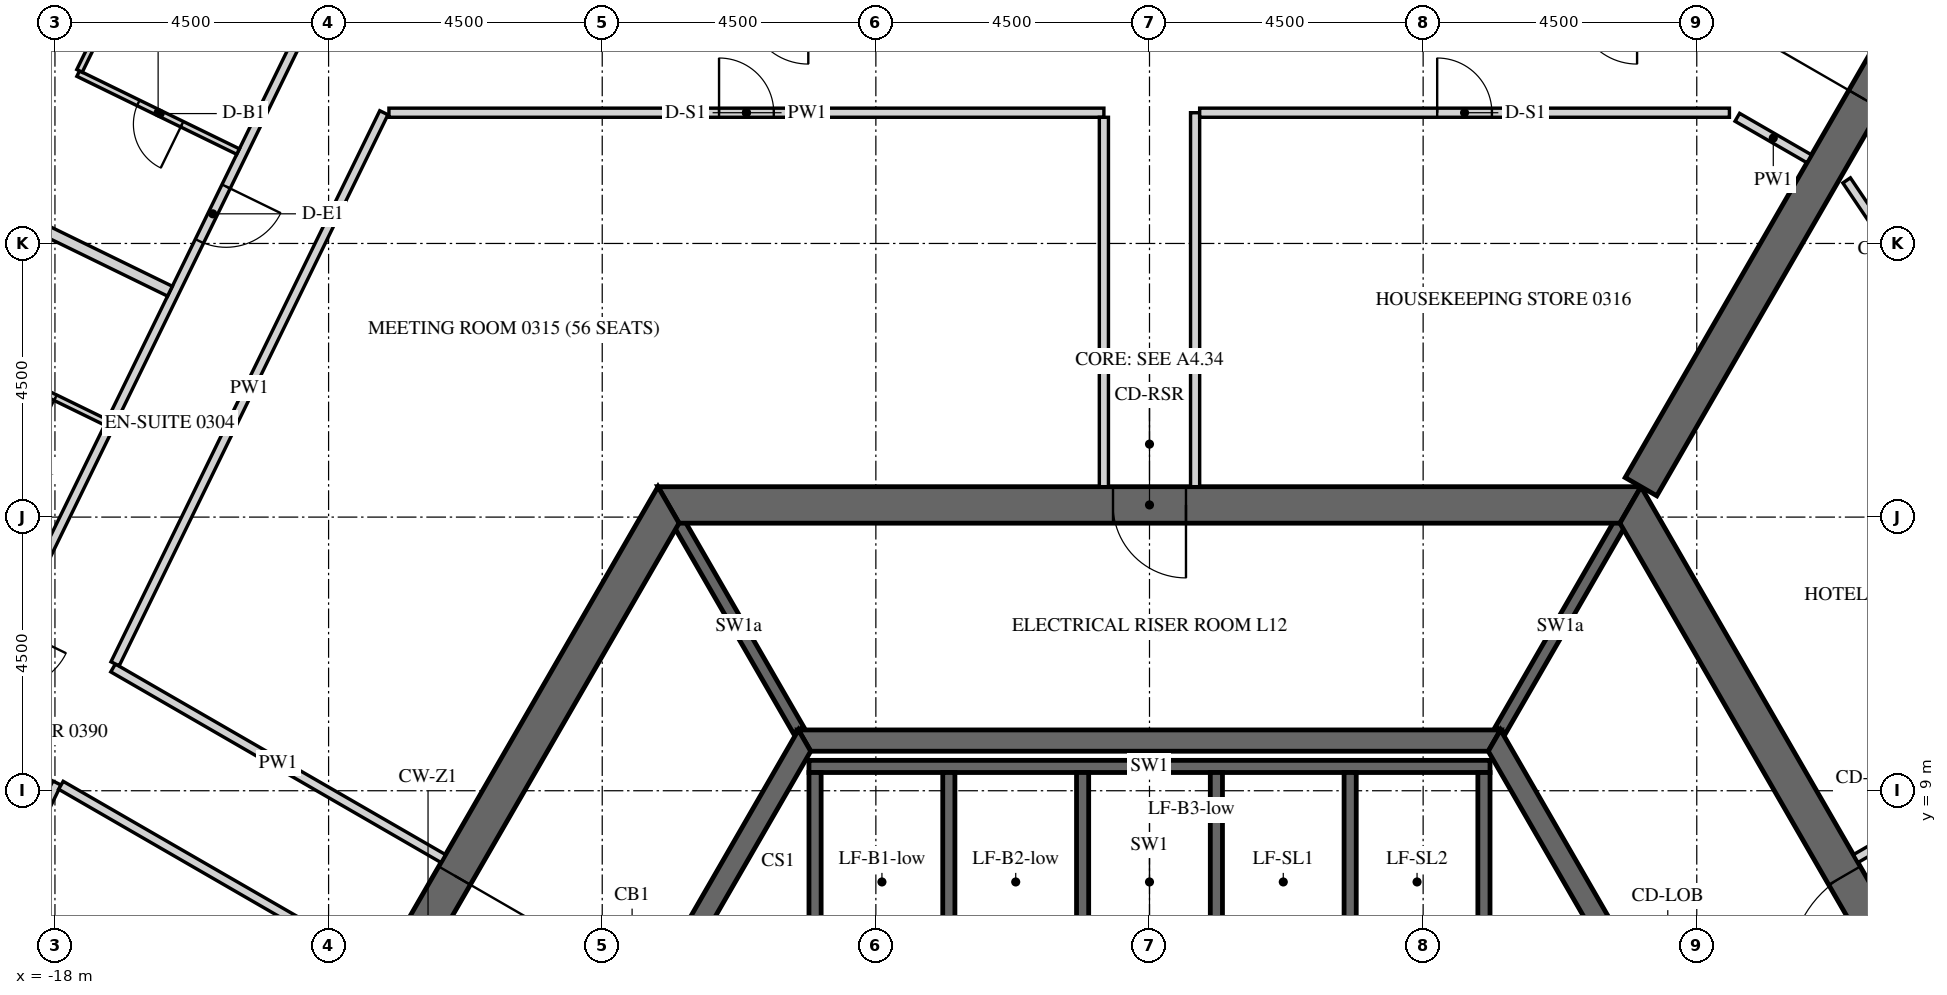
"""IFC4 building model, lengths in metres.
Left out: names, types, materials, properties, quantities, classifications, styles, units other than length and angle.
Written with IfcOpenShell. Run it as: python <this file> out.ifc"""

import sys

from ifc_helpers import new_model, si_unit, direction, frame, frame_2d, origin, place, context, subcontext, project, spatial, polyline, rectangle, outline, extrude, element, fill, save


model = new_model("IFC4")
c1 = context("Model", 3, precision=1e-05, world=origin(), true_north=direction((0.0, 1.0)))
c2 = subcontext(c1, "Body", "Model", "MODEL_VIEW")
j1 = project(units=[si_unit("LENGTHUNIT", "METRE"), si_unit("PLANEANGLEUNIT", "RADIAN")], contexts=[c1])
p1 = place(None, origin())
s1 = spatial("IfcSite", under=j1, at=p1, CompositionType="ELEMENT")
p2 = place(p1, origin())
s2 = spatial("IfcBuilding", under=s1, at=p2, CompositionType="ELEMENT")
p3 = place(p2, frame((0.0, 0.0, 60.9)))
s3 = spatial("IfcBuildingStorey", under=s2, at=p3, CompositionType="ELEMENT", Elevation=60.9)
p4 = place(p3, frame((-7.91, 13.7, -0.15), z_axis=(0.0, 0.0, 1.0), x_axis=(-0.499999880136, -0.866025472988, 0.0)))
e1 = element("IfcWall", 1, at=p4, inside=s3, PredefinedType="SHEAR", context=c2, shape_type="SweptSolid", body=[
    extrude(outline(polyline([(-0.173, -0.3), (15.993, -0.3), (15.646, 0.3), (0.173, 0.3), (-0.173, -0.3)])), origin(), (0.0, 0.0, 1.0), 3.9),
])
p5 = place(p4, frame((7.039, 0.0, 0.15)))
e2 = element("IfcOpeningElement", 2, at=p5, cuts=e1, PredefinedType="OPENING", context=c2, shape_type="SweptSolid", body=[
    extrude(rectangle(XDim=1.8, YDim=2.4, at=frame_2d((0.9, 1.2))), frame((0.0, 0.31, 0.0), z_axis=(0.0, -1.0, 0.0), x_axis=(1.0, 0.0, 0.0)), (0.0, 0.0, 1.0), 0.62),
])
p6 = place(p3, frame((15.819, 0.0, -0.15), z_axis=(0.0, 0.0, 1.0), x_axis=(-0.499999880136, 0.866025472988, 0.0)))
e3 = element("IfcWall", 3, at=p6, inside=s3, PredefinedType="SHEAR", context=c2, shape_type="SweptSolid", body=[
    extrude(outline(polyline([(-0.173, -0.3), (15.993, -0.3), (15.646, 0.3), (0.173, 0.3), (-0.173, -0.3)])), origin(), (0.0, 0.0, 1.0), 3.9),
])
p7 = place(p6, frame((6.981, 0.0, 0.15)))
e4 = element("IfcOpeningElement", 4, at=p7, cuts=e3, PredefinedType="OPENING", context=c2, shape_type="SweptSolid", body=[
    extrude(rectangle(XDim=1.8, YDim=2.4, at=frame_2d((0.9, 1.2))), frame((0.0, 0.31, 0.0), z_axis=(0.0, -1.0, 0.0), x_axis=(1.0, 0.0, 0.0)), (0.0, 0.0, 1.0), 0.62),
])
p8 = place(p3, frame((7.91, 13.7, -0.15), z_axis=(0.0, 0.0, 1.0), x_axis=(-1.0, 0.0, 0.0)))
e5 = element("IfcWall", 5, at=p8, inside=s3, PredefinedType="SHEAR", context=c2, shape_type="SweptSolid", body=[
    extrude(outline(polyline([(-0.173, -0.3), (15.993, -0.3), (15.646, 0.3), (0.173, 0.3), (-0.173, -0.3)])), origin(), (0.0, 0.0, 1.0), 3.9),
])
p9 = place(p8, frame((7.31, 0.0, 0.15)))
e6 = element("IfcOpeningElement", 6, at=p9, cuts=e5, PredefinedType="OPENING", context=c2, shape_type="SweptSolid", body=[
    extrude(rectangle(XDim=1.2, YDim=2.4, at=frame_2d((0.6, 1.2))), frame((0.0, 0.31, 0.0), z_axis=(0.0, -1.0, 0.0), x_axis=(1.0, 0.0, 0.0)), (0.0, 0.0, 1.0), 0.62),
])
p10 = place(p3, frame((8.083, 14.0, -0.15), z_axis=(0.0, 0.0, 1.0), x_axis=(0.499997680643, 0.866026742862, 0.0)))
e7 = element("IfcWall", 7, at=p10, inside=s3, PredefinedType="SHEAR", context=c2, shape_type="SweptSolid", body=[
    extrude(rectangle(XDim=16.509, YDim=0.6, at=frame_2d((8.254, 0.0))), origin(), (0.0, 0.0, 1.0), 3.9),
])
p11 = place(p10, frame((7.354, 0.0, 0.15)))
e8 = element("IfcOpeningElement", 8, at=p11, cuts=e7, PredefinedType="OPENING", context=c2, shape_type="SweptSolid", body=[
    extrude(rectangle(XDim=1.8, YDim=2.4, at=frame_2d((0.9, 1.2))), frame((0.0, 0.31, 0.0), z_axis=(0.0, -1.0, 0.0), x_axis=(1.0, 0.0, 0.0)), (0.0, 0.0, 1.0), 0.62),
])
p12 = place(p3, frame((-5.673, 9.825, -0.15), z_axis=(0.0, 0.0, 1.0), x_axis=(-0.499995046907, -0.866028263435, 0.0)))
e9 = element("IfcWall", 9, at=p12, inside=s3, PredefinedType="SHEAR", context=c2, shape_type="SweptSolid", body=[
    extrude(outline(polyline([(-0.101, -0.175), (11.446, -0.175), (11.244, 0.175), (0.101, 0.175), (-0.101, -0.175)])), origin(), (0.0, 0.0, 1.0), 3.9),
])
p13 = place(p12, frame((4.801, 0.0, 0.15)))
e10 = element("IfcOpeningElement", 10, at=p13, cuts=e9, PredefinedType="OPENING", context=c2, shape_type="SweptSolid", body=[
    extrude(rectangle(XDim=1.8, YDim=2.4, at=frame_2d((0.9, 1.2))), frame((0.0, 0.185, 0.0), z_axis=(0.0, -1.0, 0.0), x_axis=(1.0, 0.0, 0.0)), (0.0, 0.0, 1.0), 0.37),
])
p14 = place(p3, frame((11.345, 0.0, -0.15), z_axis=(0.0, 0.0, 1.0), x_axis=(-0.499995046907, 0.866028263435, 0.0)))
e11 = element("IfcWall", 11, at=p14, inside=s3, PredefinedType="SHEAR", context=c2, shape_type="SweptSolid", body=[
    extrude(outline(polyline([(-0.101, -0.175), (11.446, -0.175), (11.244, 0.175), (0.101, 0.175), (-0.101, -0.175)])), origin(), (0.0, 0.0, 1.0), 3.9),
])
p15 = place(p14, frame((4.744, 0.0, 0.15)))
e12 = element("IfcOpeningElement", 12, at=p15, cuts=e11, PredefinedType="OPENING", context=c2, shape_type="SweptSolid", body=[
    extrude(rectangle(XDim=1.8, YDim=2.4, at=frame_2d((0.9, 1.2))), frame((0.0, 0.185, 0.0), z_axis=(0.0, -1.0, 0.0), x_axis=(1.0, 0.0, 0.0)), (0.0, 0.0, 1.0), 0.37),
])
p16 = place(p3, frame((5.673, 9.825, -0.15), z_axis=(0.0, 0.0, 1.0), x_axis=(-1.0, 0.0, 0.0)))
e13 = element("IfcWall", 13, at=p16, inside=s3, PredefinedType="SHEAR", context=c2, shape_type="SweptSolid", body=[
    extrude(outline(polyline([(-0.101, -0.175), (11.446, -0.175), (11.244, 0.175), (0.101, 0.175), (-0.101, -0.175)])), origin(), (0.0, 0.0, 1.0), 3.9),
])
p17 = place(p3, frame((-5.6, 9.4, -0.25), z_axis=(0.0, 0.0, 1.0), x_axis=(1.0, 0.0, 0.0)))
e14 = element("IfcWall", 14, at=p17, inside=s3, PredefinedType="SHEAR", context=c2, shape_type="SweptSolid", body=[
    extrude(rectangle(XDim=11.2, YDim=0.2, at=frame_2d((5.6, 0.0))), origin(), (0.0, 0.0, 1.0), 3.9),
])
for number, where, z_axis, x_axis in (
    (15, (-5.5, 6.4, -0.25), (0.0, 0.0, 1.0), (0.0, 1.0, 0.0)),
    (16, (-3.3, 6.4, -0.25), (0.0, 0.0, 1.0), (0.0, 1.0, 0.0)),
    (17, (-1.1, 6.4, -0.25), (0.0, 0.0, 1.0), (0.0, 1.0, 0.0)),
    (18, (1.1, 6.4, -0.25), (0.0, 0.0, 1.0), (0.0, 1.0, 0.0)),
    (19, (3.3, 6.4, -0.25), (0.0, 0.0, 1.0), (0.0, 1.0, 0.0)),
    (20, (5.5, 6.4, -0.25), (0.0, 0.0, 1.0), (0.0, 1.0, 0.0)),
):
    element("IfcWall", number, at=place(p3, frame(where, z_axis=z_axis, x_axis=x_axis)), inside=s3, PredefinedType="SHEAR", context=c2, shape_type="SweptSolid", body=[
        extrude(rectangle(XDim=2.9, YDim=0.2, at=frame_2d((1.45, 0.0))), origin(), (0.0, 0.0, 1.0), 3.9),
    ])
for number, where, z_axis, x_axis in (
    (21, (5.773, 10.0, -0.15), (0.0, 0.0, 1.0), (0.5, 0.866, 0.0)),
    (22, (-5.773, 10.0, -0.15), (0.0, 0.0, 1.0), (-0.5, 0.866, 0.0)),
):
    element("IfcWall", number, at=place(p3, frame(where, z_axis=z_axis, x_axis=x_axis)), inside=s3, PredefinedType="SHEAR", context=c2, shape_type="SweptSolid", body=[
        extrude(rectangle(XDim=3.926, YDim=0.2, at=frame_2d((1.963, 0.0))), origin(), (0.0, 0.0, 1.0), 3.9),
    ])
p18 = place(p3, frame((-13.752, 21.875, 0.0), z_axis=(0.0, 0.0, 1.0), x_axis=(-0.438376846054, -0.898791266559, 0.0)))
e23 = element("IfcWall", 23, at=p18, inside=s3, PredefinedType="PARTITIONING", context=c2, shape_type="SweptSolid", body=[
    extrude(rectangle(XDim=22.002, YDim=0.15, at=frame_2d((11.001, 0.0))), origin(), (0.0, 0.0, 1.0), 2.988),
])
p19 = place(p18, frame((3.269, 0.0, 0.0)))
e24 = element("IfcOpeningElement", 24, at=p19, cuts=e23, PredefinedType="OPENING", context=c2, shape_type="SweptSolid", body=[
    extrude(rectangle(XDim=1.0, YDim=2.1, at=frame_2d((0.5, 1.05))), frame((0.0, 0.085, 0.0), z_axis=(0.0, -1.0, 0.0), x_axis=(1.0, 0.0, 0.0)), (0.0, 0.0, 1.0), 0.17),
])
p20 = place(p18, frame((11.321, 0.0, 0.0)))
e25 = element("IfcOpeningElement", 25, at=p20, cuts=e23, PredefinedType="OPENING", context=c2, shape_type="SweptSolid", body=[
    extrude(rectangle(XDim=1.0, YDim=2.1, at=frame_2d((0.5, 1.05))), frame((0.0, 0.085, 0.0), z_axis=(0.0, -1.0, 0.0), x_axis=(1.0, 0.0, 0.0)), (0.0, 0.0, 1.0), 0.17),
])
p21 = place(p18, frame((19.812, 0.0, 0.0)))
e26 = element("IfcOpeningElement", 26, at=p21, cuts=e23, PredefinedType="OPENING", context=c2, shape_type="SweptSolid", body=[
    extrude(rectangle(XDim=1.0, YDim=2.1, at=frame_2d((0.5, 1.05))), frame((0.0, 0.085, 0.0), z_axis=(0.0, -1.0, 0.0), x_axis=(1.0, 0.0, 0.0)), (0.0, 0.0, 1.0), 0.17),
])
p22 = place(p3, frame((-11.614, 7.884, 0.0), z_axis=(0.0, 0.0, 1.0), x_axis=(-0.866025438137, 0.4999999405, 0.0)))
e27 = element("IfcWall", 27, at=p22, inside=s3, PredefinedType="PARTITIONING", context=c2, shape_type="SweptSolid", body=[
    extrude(rectangle(XDim=6.271, YDim=0.15, at=frame_2d((3.135, 0.0))), origin(), (0.0, 0.0, 1.0), 2.988),
])
p23 = place(p3, frame((-17.011, 11.087, 0.0), z_axis=(0.0, 0.0, 1.0), x_axis=(0.43836877185, 0.898795204631, 0.0)))
e28 = element("IfcWall", 28, at=p23, inside=s3, PredefinedType="PARTITIONING", context=c2, shape_type="SweptSolid", body=[
    extrude(rectangle(XDim=10.083, YDim=0.15, at=frame_2d((5.042, 0.0))), origin(), (0.0, 0.0, 1.0), 2.988),
])
p24 = place(p3, frame((-12.508, 20.15, 0.0), z_axis=(0.0, 0.0, 1.0), x_axis=(1.0, 0.0, 0.0)))
e29 = element("IfcWall", 29, at=p24, inside=s3, PredefinedType="PARTITIONING", context=c2, shape_type="SweptSolid", body=[
    extrude(rectangle(XDim=11.758, YDim=0.15, at=frame_2d((5.879, 0.0))), origin(), (0.0, 0.0, 1.0), 2.988),
])
p25 = place(p24, frame((5.429, 0.0, 0.0)))
e30 = element("IfcOpeningElement", 30, at=p25, cuts=e29, PredefinedType="OPENING", context=c2, shape_type="SweptSolid", body=[
    extrude(rectangle(XDim=0.9, YDim=2.1, at=frame_2d((0.45, 1.05))), frame((0.0, 0.085, 0.0), z_axis=(0.0, -1.0, 0.0), x_axis=(1.0, 0.0, 0.0)), (0.0, 0.0, 1.0), 0.17),
])
p26 = place(p3, frame((-0.75, 20.075, 0.0), z_axis=(0.0, 0.0, 1.0), x_axis=(0.0, -1.0, 0.0)))
e31 = element("IfcWall", 31, at=p26, inside=s3, PredefinedType="PARTITIONING", context=c2, shape_type="SweptSolid", body=[
    extrude(rectangle(XDim=6.075, YDim=0.15, at=frame_2d((3.038, 0.0))), origin(), (0.0, 0.0, 1.0), 2.988),
])
p27 = place(p3, frame((0.75, 14.0, 0.0), z_axis=(0.0, 0.0, 1.0), x_axis=(0.0, 1.0, 0.0)))
e32 = element("IfcWall", 32, at=p27, inside=s3, PredefinedType="PARTITIONING", context=c2, shape_type="SweptSolid", body=[
    extrude(rectangle(XDim=6.15, YDim=0.15, at=frame_2d((3.075, 0.0))), origin(), (0.0, 0.0, 1.0), 2.988),
])
p28 = place(p3, frame((0.825, 20.15, 0.0), z_axis=(0.0, 0.0, 1.0), x_axis=(1.0, 0.0, 0.0)))
e33 = element("IfcWall", 33, at=p28, inside=s3, PredefinedType="PARTITIONING", context=c2, shape_type="SweptSolid", body=[
    extrude(rectangle(XDim=8.712, YDim=0.15, at=frame_2d((4.356, 0.0))), origin(), (0.0, 0.0, 1.0), 2.988),
])
p29 = place(p28, frame((3.906, 0.0, 0.0)))
e34 = element("IfcOpeningElement", 34, at=p29, cuts=e33, PredefinedType="OPENING", context=c2, shape_type="SweptSolid", body=[
    extrude(rectangle(XDim=0.9, YDim=2.1, at=frame_2d((0.45, 1.05))), frame((0.0, 0.085, 0.0), z_axis=(0.0, -1.0, 0.0), x_axis=(1.0, 0.0, 0.0)), (0.0, 0.0, 1.0), 0.17),
])
p30 = place(p3, frame((9.667, 20.075, 0.0), z_axis=(0.0, 0.0, 1.0), x_axis=(0.866000994684, -0.500042275419, 0.0)))
e35 = element("IfcWall", 35, at=p30, inside=s3, PredefinedType="PARTITIONING", context=c2, shape_type="SweptSolid", body=[
    extrude(rectangle(XDim=1.366, YDim=0.15, at=frame_2d((0.683, 0.0))), origin(), (0.0, 0.0, 1.0), 2.988),
])
p31 = place(p3, frame((-22.219, 0.41, 0.0), z_axis=(0.0, 0.0, 1.0), x_axis=(0.438391891827, 0.898783927972, 0.0)))
e36 = element("IfcWall", 36, at=p31, inside=s3, PredefinedType="PARTITIONING", context=c2, shape_type="SweptSolid", body=[
    extrude(rectangle(XDim=9.699, YDim=0.15, at=frame_2d((4.85, 0.0))), origin(), (0.0, 0.0, 1.0), 2.988),
])
p32 = place(p31, frame((4.4, 0.0, 0.0)))
e37 = element("IfcOpeningElement", 37, at=p32, cuts=e36, PredefinedType="OPENING", context=c2, shape_type="SweptSolid", body=[
    extrude(rectangle(XDim=0.9, YDim=2.1, at=frame_2d((0.45, 1.05))), frame((0.0, 0.085, 0.0), z_axis=(0.0, -1.0, 0.0), x_axis=(1.0, 0.0, 0.0)), (0.0, 0.0, 1.0), 0.17),
])
p33 = place(p3, frame((-17.902, 9.09, 0.0), z_axis=(0.0, 0.0, 1.0), x_axis=(0.866036368755, -0.499981007633, 0.0)))
e38 = element("IfcWall", 38, at=p33, inside=s3, PredefinedType="PARTITIONING", context=c2, shape_type="SweptSolid", body=[
    extrude(rectangle(XDim=6.049, YDim=0.15, at=frame_2d((3.024, 0.0))), origin(), (0.0, 0.0, 1.0), 2.988),
])
p34 = place(p3, frame((11.465, 19.037, 0.0), z_axis=(0.0, 0.0, 1.0), x_axis=(0.559196064773, -0.829035440221, 0.0)))
e39 = element("IfcWall", 39, at=p34, inside=s3, PredefinedType="PARTITIONING", context=c2, shape_type="SweptSolid", body=[
    extrude(rectangle(XDim=9.757, YDim=0.15, at=frame_2d((4.878, 0.0))), origin(), (0.0, 0.0, 1.0), 2.988),
])
p35 = place(p34, frame((4.428, 0.0, 0.0)))
e40 = element("IfcOpeningElement", 40, at=p35, cuts=e39, PredefinedType="OPENING", context=c2, shape_type="SweptSolid", body=[
    extrude(rectangle(XDim=0.9, YDim=2.1, at=frame_2d((0.45, 1.05))), frame((0.0, 0.085, 0.0), z_axis=(0.0, -1.0, 0.0), x_axis=(1.0, 0.0, 0.0)), (0.0, 0.0, 1.0), 0.17),
])
p36 = place(p3, frame((16.855, 10.911, 0.0), z_axis=(0.0, 0.0, 1.0), x_axis=(-0.866020343444, -0.500008764664, 0.0)))
e41 = element("IfcWall", 41, at=p36, inside=s3, PredefinedType="PARTITIONING", context=c2, shape_type="SweptSolid", body=[
    extrude(rectangle(XDim=6.053, YDim=0.15, at=frame_2d((3.026, 0.0))), origin(), (0.0, 0.0, 1.0), 2.988),
])
p37 = place(p3, frame((-14.989, 19.511, 0.0), z_axis=(0.0, 0.0, 1.0), x_axis=(-0.898790906006, 0.438377585285, 0.0)))
e42 = element("IfcWall", 42, at=p37, inside=s3, PredefinedType="PARTITIONING", context=c2, shape_type="SweptSolid", body=[
    extrude(rectangle(XDim=2.925, YDim=0.1, at=frame_2d((1.462, 0.0))), origin(), (0.0, 0.0, 1.0), 2.988),
])
p38 = place(p37, frame((1.025, 0.0, 0.0)))
e43 = element("IfcOpeningElement", 43, at=p38, cuts=e42, PredefinedType="OPENING", context=c2, shape_type="SweptSolid", body=[
    extrude(rectangle(XDim=0.8, YDim=2.1, at=frame_2d((0.4, 1.05))), frame((0.0, 0.06, 0.0), z_axis=(0.0, -1.0, 0.0), x_axis=(1.0, 0.0, 0.0)), (0.0, 0.0, 1.0), 0.12),
])
p39 = place(p3, frame((-17.596, 20.838, 0.0), z_axis=(0.0, 0.0, 1.0), x_axis=(0.438423632021, 0.898768445644, 0.0)))
e44 = element("IfcWall", 44, at=p39, inside=s3, PredefinedType="PARTITIONING", context=c2, shape_type="SweptSolid", body=[
    extrude(rectangle(XDim=2.35, YDim=0.1, at=frame_2d((1.175, 0.0))), origin(), (0.0, 0.0, 1.0), 2.988),
])
p40 = place(p3, frame((-22.782, 20.47, 0.0), z_axis=(0.0, 0.0, 1.0), x_axis=(0.898783297359, -0.438393184697, 0.0)))
e45 = element("IfcWall", 45, at=p40, inside=s3, PredefinedType="PARTITIONING", context=c2, shape_type="SweptSolid", body=[
    extrude(rectangle(XDim=7.425, YDim=0.18, at=frame_2d((3.712, 0.0))), origin(), (0.0, 0.0, 1.0), 2.988),
])
p41 = place(p3, frame((-17.161, 15.058, 0.0), z_axis=(0.0, 0.0, 1.0), x_axis=(-0.898791692788, 0.43837597217, 0.0)))
e46 = element("IfcWall", 46, at=p41, inside=s3, PredefinedType="PARTITIONING", context=c2, shape_type="SweptSolid", body=[
    extrude(rectangle(XDim=2.725, YDim=0.1, at=frame_2d((1.363, 0.0))), origin(), (0.0, 0.0, 1.0), 2.988),
])
p42 = place(p41, frame((0.925, 0.0, 0.0)))
e47 = element("IfcOpeningElement", 47, at=p42, cuts=e46, PredefinedType="OPENING", context=c2, shape_type="SweptSolid", body=[
    extrude(rectangle(XDim=0.8, YDim=2.1, at=frame_2d((0.4, 1.05))), frame((0.0, 0.06, 0.0), z_axis=(0.0, -1.0, 0.0), x_axis=(1.0, 0.0, 0.0)), (0.0, 0.0, 1.0), 0.12),
])
p43 = place(p5, origin())
e48 = element("IfcDoor", 48, at=p43, inside=s3, OperationType="DOUBLE_DOOR_SINGLE_SWING", PredefinedType="DOOR", context=c2, shape_type="SweptSolid", body=[
    extrude(rectangle(XDim=1.8, YDim=2.4, at=frame_2d((0.9, 1.2))), frame((0.0, 0.025, 0.0), z_axis=(0.0, -1.0, 0.0), x_axis=(1.0, 0.0, 0.0)), (0.0, 0.0, 1.0), 0.05),
])
fill(e2, e48)
p44 = place(p7, origin())
e49 = element("IfcDoor", 49, at=p44, inside=s3, OperationType="DOUBLE_DOOR_SINGLE_SWING", PredefinedType="DOOR", context=c2, shape_type="SweptSolid", body=[
    extrude(rectangle(XDim=1.8, YDim=2.4, at=frame_2d((0.9, 1.2))), frame((0.0, 0.025, 0.0), z_axis=(0.0, -1.0, 0.0), x_axis=(1.0, 0.0, 0.0)), (0.0, 0.0, 1.0), 0.05),
])
fill(e4, e49)
p45 = place(p9, origin())
e50 = element("IfcDoor", 50, at=p45, inside=s3, OperationType="SINGLE_SWING_LEFT", PredefinedType="DOOR", context=c2, shape_type="SweptSolid", body=[
    extrude(rectangle(XDim=1.2, YDim=2.4, at=frame_2d((0.6, 1.2))), frame((0.0, 0.025, 0.0), z_axis=(0.0, -1.0, 0.0), x_axis=(1.0, 0.0, 0.0)), (0.0, 0.0, 1.0), 0.05),
])
fill(e6, e50)
p46 = place(p11, origin())
e51 = element("IfcDoor", 51, at=p46, inside=s3, OperationType="DOUBLE_DOOR_SINGLE_SWING", PredefinedType="DOOR", context=c2, shape_type="SweptSolid", body=[
    extrude(rectangle(XDim=1.8, YDim=2.4, at=frame_2d((0.9, 1.2))), frame((0.0, 0.025, 0.0), z_axis=(0.0, -1.0, 0.0), x_axis=(1.0, 0.0, 0.0)), (0.0, 0.0, 1.0), 0.05),
])
fill(e8, e51)
p47 = place(p19, origin())
e52 = element("IfcDoor", 52, at=p47, inside=s3, OperationType="SINGLE_SWING_LEFT", PredefinedType="DOOR", context=c2, shape_type="SweptSolid", body=[
    extrude(rectangle(XDim=1.0, YDim=2.1, at=frame_2d((0.5, 1.05))), frame((0.0, 0.025, 0.0), z_axis=(0.0, -1.0, 0.0), x_axis=(1.0, 0.0, 0.0)), (0.0, 0.0, 1.0), 0.05),
])
fill(e24, e52)
p48 = place(p38, origin())
e53 = element("IfcDoor", 53, at=p48, inside=s3, OperationType="SINGLE_SWING_RIGHT", PredefinedType="DOOR", context=c2, shape_type="SweptSolid", body=[
    extrude(rectangle(XDim=0.8, YDim=2.1, at=frame_2d((0.4, 1.05))), frame((0.0, 0.025, 0.0), z_axis=(0.0, -1.0, 0.0), x_axis=(1.0, 0.0, 0.0)), (0.0, 0.0, 1.0), 0.05),
])
fill(e43, e53)
p49 = place(p42, origin())
e54 = element("IfcDoor", 54, at=p49, inside=s3, OperationType="SINGLE_SWING_RIGHT", PredefinedType="DOOR", context=c2, shape_type="SweptSolid", body=[
    extrude(rectangle(XDim=0.8, YDim=2.1, at=frame_2d((0.4, 1.05))), frame((0.0, 0.025, 0.0), z_axis=(0.0, -1.0, 0.0), x_axis=(1.0, 0.0, 0.0)), (0.0, 0.0, 1.0), 0.05),
])
fill(e47, e54)
p50 = place(p25, origin())
e55 = element("IfcDoor", 55, at=p50, inside=s3, OperationType="SINGLE_SWING_RIGHT", PredefinedType="DOOR", context=c2, shape_type="SweptSolid", body=[
    extrude(rectangle(XDim=0.9, YDim=2.1, at=frame_2d((0.45, 1.05))), frame((0.0, 0.025, 0.0), z_axis=(0.0, -1.0, 0.0), x_axis=(1.0, 0.0, 0.0)), (0.0, 0.0, 1.0), 0.05),
])
fill(e30, e55)
p51 = place(p29, origin())
e56 = element("IfcDoor", 56, at=p51, inside=s3, OperationType="SINGLE_SWING_RIGHT", PredefinedType="DOOR", context=c2, shape_type="SweptSolid", body=[
    extrude(rectangle(XDim=0.9, YDim=2.1, at=frame_2d((0.45, 1.05))), frame((0.0, 0.025, 0.0), z_axis=(0.0, -1.0, 0.0), x_axis=(1.0, 0.0, 0.0)), (0.0, 0.0, 1.0), 0.05),
])
fill(e34, e56)
save(model, sys.argv[1])
